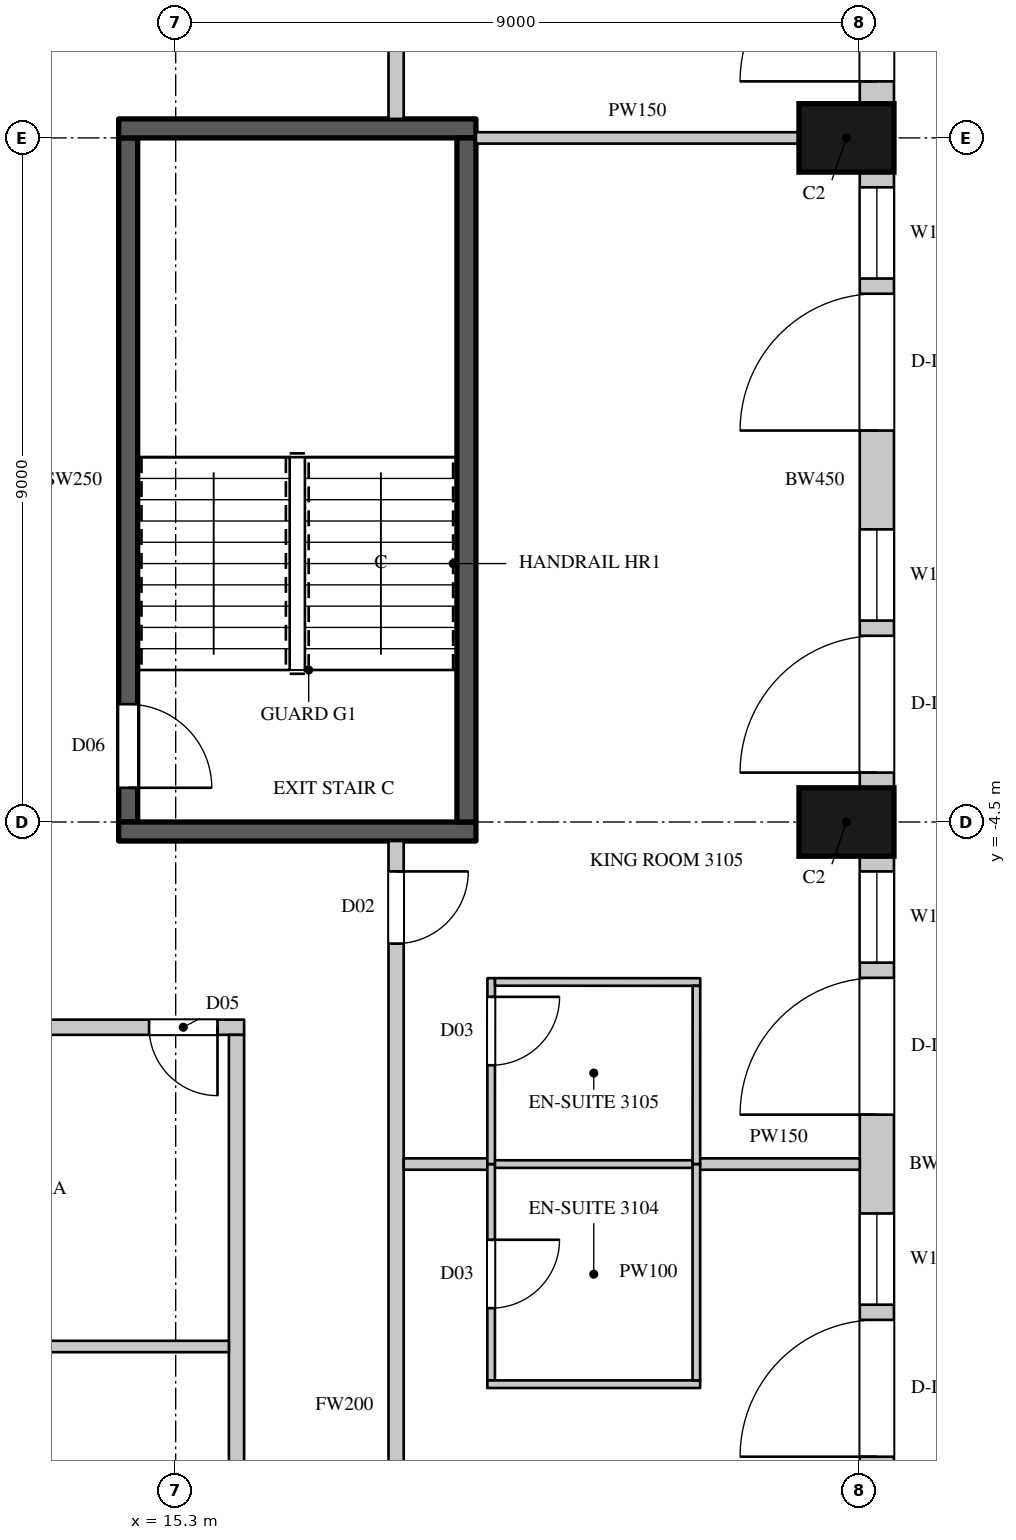
"""IFC4 building model, lengths in metres.
Left out: names, types, materials, properties, quantities, classifications, styles, units other than length and angle.
Written with IfcOpenShell. Run it as: python <this file> out.ifc"""

import sys

from ifc_helpers import new_model, si_unit, direction, frame, frame_2d, origin, origin_2d, place, context, subcontext, project, spatial, rectangle, extrude, element, fill, save


model = new_model("IFC4")
c1 = context("Model", 3, precision=1e-05, world=origin(), true_north=direction((0.0, 1.0)))
c2 = subcontext(c1, "Body", "Model", "MODEL_VIEW")
j1 = project(units=[si_unit("LENGTHUNIT", "METRE"), si_unit("PLANEANGLEUNIT", "RADIAN")], contexts=[c1])
p1 = place(None, origin())
s1 = spatial("IfcSite", under=j1, at=p1, CompositionType="ELEMENT")
p2 = place(p1, origin())
s2 = spatial("IfcBuilding", under=s1, at=p2, CompositionType="ELEMENT")
p3 = place(p2, frame((0.0, 0.0, 141.9)))
s3 = spatial("IfcBuildingStorey", under=s2, at=p3, CompositionType="ELEMENT", Elevation=141.9)
for number, where, z_axis, x_axis in (
    (1, (24.125, -4.5, 0.0), (0.0, 0.0, 1.0), (0.0, 1.0, 0.0)),
    (2, (24.125, 4.5, 0.0), (0.0, 0.0, 1.0), (0.0, 1.0, 0.0)),
):
    element("IfcColumn", number, at=place(p3, frame(where, z_axis=z_axis, x_axis=x_axis)), inside=s3, PredefinedType="COLUMN", context=c2, shape_type="SweptSolid", body=[
        extrude(rectangle(XDim=0.9, YDim=1.25, at=origin_2d()), origin(), (0.0, 0.0, 1.0), 3.6),
    ])
p4 = place(p3, frame((24.525, -13.05, 0.0), z_axis=(0.0, 0.0, 1.0), x_axis=(0.0, 1.0, 0.0)))
e3 = element("IfcWall", 3, at=p4, inside=s3, PredefinedType="SOLIDWALL", context=c2, shape_type="SweptSolid", body=[
    extrude(rectangle(XDim=8.1, YDim=0.45, at=frame_2d((4.05, 0.0))), origin(), (0.0, 0.0, 1.0), 3.3),
])
p5 = place(p4, frame((0.2, 0.0, 0.0)))
e4 = element("IfcOpeningElement", 4, at=p5, cuts=e3, PredefinedType="OPENING", context=c2, shape_type="SweptSolid", body=[
    extrude(rectangle(XDim=1.8, YDim=2.4, at=frame_2d((0.9, 1.2))), frame((0.0, 0.235, 0.0), z_axis=(0.0, -1.0, 0.0), x_axis=(1.0, 0.0, 0.0)), (0.0, 0.0, 1.0), 0.47),
])
p6 = place(p4, frame((2.2, 0.0, 1.05)))
e5 = element("IfcOpeningElement", 5, at=p6, cuts=e3, PredefinedType="OPENING", context=c2, shape_type="SweptSolid", body=[
    extrude(rectangle(XDim=1.2, YDim=2.0, at=frame_2d((0.6, 1.0))), frame((0.0, 0.235, 0.0), z_axis=(0.0, -1.0, 0.0), x_axis=(1.0, 0.0, 0.0)), (0.0, 0.0, 1.0), 0.47),
])
p7 = place(p4, frame((4.7, 0.0, 0.0)))
e6 = element("IfcOpeningElement", 6, at=p7, cuts=e3, PredefinedType="OPENING", context=c2, shape_type="SweptSolid", body=[
    extrude(rectangle(XDim=1.8, YDim=2.4, at=frame_2d((0.9, 1.2))), frame((0.0, 0.235, 0.0), z_axis=(0.0, -1.0, 0.0), x_axis=(1.0, 0.0, 0.0)), (0.0, 0.0, 1.0), 0.47),
])
p8 = place(p4, frame((6.7, 0.0, 1.05)))
e7 = element("IfcOpeningElement", 7, at=p8, cuts=e3, PredefinedType="OPENING", context=c2, shape_type="SweptSolid", body=[
    extrude(rectangle(XDim=1.2, YDim=2.0, at=frame_2d((0.6, 1.0))), frame((0.0, 0.235, 0.0), z_axis=(0.0, -1.0, 0.0), x_axis=(1.0, 0.0, 0.0)), (0.0, 0.0, 1.0), 0.47),
])
p9 = place(p3, frame((24.525, -4.05, 0.0), z_axis=(0.0, 0.0, 1.0), x_axis=(0.0, 1.0, 0.0)))
e8 = element("IfcWall", 8, at=p9, inside=s3, PredefinedType="SOLIDWALL", context=c2, shape_type="SweptSolid", body=[
    extrude(rectangle(XDim=8.1, YDim=0.45, at=frame_2d((4.05, 0.0))), origin(), (0.0, 0.0, 1.0), 3.3),
])
p10 = place(p9, frame((0.2, 0.0, 0.0)))
e9 = element("IfcOpeningElement", 9, at=p10, cuts=e8, PredefinedType="OPENING", context=c2, shape_type="SweptSolid", body=[
    extrude(rectangle(XDim=1.8, YDim=2.4, at=frame_2d((0.9, 1.2))), frame((0.0, 0.235, 0.0), z_axis=(0.0, -1.0, 0.0), x_axis=(1.0, 0.0, 0.0)), (0.0, 0.0, 1.0), 0.47),
])
p11 = place(p9, frame((2.2, 0.0, 1.05)))
e10 = element("IfcOpeningElement", 10, at=p11, cuts=e8, PredefinedType="OPENING", context=c2, shape_type="SweptSolid", body=[
    extrude(rectangle(XDim=1.2, YDim=2.0, at=frame_2d((0.6, 1.0))), frame((0.0, 0.235, 0.0), z_axis=(0.0, -1.0, 0.0), x_axis=(1.0, 0.0, 0.0)), (0.0, 0.0, 1.0), 0.47),
])
p12 = place(p9, frame((4.7, 0.0, 0.0)))
e11 = element("IfcOpeningElement", 11, at=p12, cuts=e8, PredefinedType="OPENING", context=c2, shape_type="SweptSolid", body=[
    extrude(rectangle(XDim=1.8, YDim=2.4, at=frame_2d((0.9, 1.2))), frame((0.0, 0.235, 0.0), z_axis=(0.0, -1.0, 0.0), x_axis=(1.0, 0.0, 0.0)), (0.0, 0.0, 1.0), 0.47),
])
p13 = place(p9, frame((6.7, 0.0, 1.05)))
e12 = element("IfcOpeningElement", 12, at=p13, cuts=e8, PredefinedType="OPENING", context=c2, shape_type="SweptSolid", body=[
    extrude(rectangle(XDim=1.2, YDim=2.0, at=frame_2d((0.6, 1.0))), frame((0.0, 0.235, 0.0), z_axis=(0.0, -1.0, 0.0), x_axis=(1.0, 0.0, 0.0)), (0.0, 0.0, 1.0), 0.47),
])
p14 = place(p3, frame((24.525, 4.95, 0.0), z_axis=(0.0, 0.0, 1.0), x_axis=(0.0, 1.0, 0.0)))
e13 = element("IfcWall", 13, at=p14, inside=s3, PredefinedType="SOLIDWALL", context=c2, shape_type="SweptSolid", body=[
    extrude(rectangle(XDim=8.439, YDim=0.45, at=frame_2d((4.219, 0.0))), origin(), (0.0, 0.0, 1.0), 3.3),
])
p15 = place(p14, frame((0.294, 0.0, 0.0)))
e14 = element("IfcOpeningElement", 14, at=p15, cuts=e13, PredefinedType="OPENING", context=c2, shape_type="SweptSolid", body=[
    extrude(rectangle(XDim=1.8, YDim=2.4, at=frame_2d((0.9, 1.2))), frame((0.0, 0.235, 0.0), z_axis=(0.0, -1.0, 0.0), x_axis=(1.0, 0.0, 0.0)), (0.0, 0.0, 1.0), 0.47),
])
p16 = place(p14, frame((2.294, 0.0, 1.05)))
e15 = element("IfcOpeningElement", 15, at=p16, cuts=e13, PredefinedType="OPENING", context=c2, shape_type="SweptSolid", body=[
    extrude(rectangle(XDim=1.2, YDim=2.0, at=frame_2d((0.6, 1.0))), frame((0.0, 0.235, 0.0), z_axis=(0.0, -1.0, 0.0), x_axis=(1.0, 0.0, 0.0)), (0.0, 0.0, 1.0), 0.47),
])
p17 = place(p14, frame((5.232, 0.0, 1.05)))
e16 = element("IfcOpeningElement", 16, at=p17, cuts=e13, PredefinedType="OPENING", context=c2, shape_type="SweptSolid", body=[
    extrude(rectangle(XDim=2.7, YDim=2.0, at=frame_2d((1.35, 1.0))), frame((0.0, 0.235, 0.0), z_axis=(0.0, -1.0, 0.0), x_axis=(1.0, 0.0, 0.0)), (0.0, 0.0, 1.0), 0.47),
])
p18 = place(p3, frame((10.5, -7.2, 0.0), z_axis=(0.0, 0.0, 1.0), x_axis=(1.0, 0.0, 0.0)))
e17 = element("IfcWall", 17, at=p18, inside=s3, PredefinedType="PARTITIONING", context=c2, shape_type="SweptSolid", body=[
    extrude(rectangle(XDim=5.7, YDim=0.2, at=frame_2d((2.85, 0.0))), origin(), (0.0, 0.0, 1.0), 3.3),
])
p19 = place(p18, frame((4.45, 0.0, 0.0)))
e18 = element("IfcOpeningElement", 18, at=p19, cuts=e17, PredefinedType="OPENING", context=c2, shape_type="SweptSolid", body=[
    extrude(rectangle(XDim=0.9, YDim=2.2, at=frame_2d((0.45, 1.1))), frame((0.0, 0.11, 0.0), z_axis=(0.0, -1.0, 0.0), x_axis=(1.0, 0.0, 0.0)), (0.0, 0.0, 1.0), 0.22),
])
p20 = place(p3, frame((16.1, -17.4, 0.0), z_axis=(0.0, 0.0, 1.0), x_axis=(0.0, 1.0, 0.0)))
e19 = element("IfcWall", 19, at=p20, inside=s3, PredefinedType="PARTITIONING", context=c2, shape_type="SweptSolid", body=[
    extrude(rectangle(XDim=10.1, YDim=0.2, at=frame_2d((5.05, 0.0))), origin(), (0.0, 0.0, 1.0), 3.3),
])
p21 = place(p3, frame((18.2, -19.6, 0.0), z_axis=(0.0, 0.0, 1.0), x_axis=(0.0, 1.0, 0.0)))
e20 = element("IfcWall", 20, at=p21, inside=s3, PredefinedType="PARTITIONING", context=c2, shape_type="SweptSolid", body=[
    extrude(rectangle(XDim=14.85, YDim=0.2, at=frame_2d((7.425, 0.0))), origin(), (0.0, 0.0, 1.0), 3.3),
])
p22 = place(p21, frame((3.9, 0.0, 0.0)))
e21 = element("IfcOpeningElement", 21, at=p22, cuts=e20, PredefinedType="OPENING", context=c2, shape_type="SweptSolid", body=[
    extrude(rectangle(XDim=0.95, YDim=2.2, at=frame_2d((0.475, 1.1))), frame((0.0, 0.11, 0.0), z_axis=(0.0, -1.0, 0.0), x_axis=(1.0, 0.0, 0.0)), (0.0, 0.0, 1.0), 0.22),
])
p23 = place(p21, frame((13.5, 0.0, 0.0)))
e22 = element("IfcOpeningElement", 22, at=p23, cuts=e20, PredefinedType="OPENING", context=c2, shape_type="SweptSolid", body=[
    extrude(rectangle(XDim=0.95, YDim=2.2, at=frame_2d((0.475, 1.1))), frame((0.0, 0.11, 0.0), z_axis=(0.0, -1.0, 0.0), x_axis=(1.0, 0.0, 0.0)), (0.0, 0.0, 1.0), 0.22),
])
p24 = place(p3, frame((18.2, 4.75, 0.0), z_axis=(0.0, 0.0, 1.0), x_axis=(0.0, 1.0, 0.0)))
e23 = element("IfcWall", 23, at=p24, inside=s3, PredefinedType="PARTITIONING", context=c2, shape_type="SweptSolid", body=[
    extrude(rectangle(XDim=14.164, YDim=0.2, at=frame_2d((7.082, 0.0))), origin(), (0.0, 0.0, 1.0), 3.3),
])
p25 = place(p24, frame((1.7, 0.0, 0.0)))
e24 = element("IfcOpeningElement", 24, at=p25, cuts=e23, PredefinedType="OPENING", context=c2, shape_type="SweptSolid", body=[
    extrude(rectangle(XDim=0.9, YDim=2.2, at=frame_2d((0.45, 1.1))), frame((0.0, 0.11, 0.0), z_axis=(0.0, -1.0, 0.0), x_axis=(1.0, 0.0, 0.0)), (0.0, 0.0, 1.0), 0.22),
])
p26 = place(p3, frame((10.4, -11.4, 0.0), z_axis=(0.0, 0.0, 1.0), x_axis=(1.0, 0.0, 0.0)))
e25 = element("IfcWall", 25, at=p26, inside=s3, PredefinedType="PARTITIONING", context=c2, shape_type="SweptSolid", body=[
    extrude(rectangle(XDim=5.6, YDim=0.15, at=frame_2d((2.8, 0.0))), origin(), (0.0, 0.0, 1.0), 3.3),
])
p27 = place(p3, frame((18.3, -9.0, 0.0), z_axis=(0.0, 0.0, 1.0), x_axis=(1.0, 0.0, 0.0)))
e26 = element("IfcWall", 26, at=p27, inside=s3, PredefinedType="PARTITIONING", context=c2, shape_type="SweptSolid", body=[
    extrude(rectangle(XDim=1.13, YDim=0.15, at=frame_2d((0.565, 0.0))), origin(), (0.0, 0.0, 1.0), 3.3),
])
p28 = place(p3, frame((19.25, 4.5, 0.0), z_axis=(0.0, 0.0, 1.0), x_axis=(1.0, 0.0, 0.0)))
e27 = element("IfcWall", 27, at=p28, inside=s3, PredefinedType="PARTITIONING", context=c2, shape_type="SweptSolid", body=[
    extrude(rectangle(XDim=4.25, YDim=0.15, at=frame_2d((2.125, 0.0))), origin(), (0.0, 0.0, 1.0), 3.3),
])
p29 = place(p3, frame((22.17, -9.0, 0.0), z_axis=(0.0, 0.0, 1.0), x_axis=(1.0, 0.0, 0.0)))
e28 = element("IfcWall", 28, at=p29, inside=s3, PredefinedType="PARTITIONING", context=c2, shape_type="SweptSolid", body=[
    extrude(rectangle(XDim=2.13, YDim=0.15, at=frame_2d((1.065, 0.0))), origin(), (0.0, 0.0, 1.0), 3.3),
])
p30 = place(p3, frame((14.675, -4.5, 0.0), z_axis=(0.0, 0.0, 1.0), x_axis=(0.0, 1.0, 0.0)))
e29 = element("IfcWall", 29, at=p30, inside=s3, PredefinedType="SHEAR", context=c2, shape_type="SweptSolid", body=[
    extrude(rectangle(XDim=9.0, YDim=0.25, at=frame_2d((4.5, 0.0))), origin(), (0.0, 0.0, 1.0), 3.3),
])
p31 = place(p30, frame((0.45, 0.0, 0.0)))
e30 = element("IfcOpeningElement", 30, at=p31, cuts=e29, PredefinedType="OPENING", context=c2, shape_type="SweptSolid", body=[
    extrude(rectangle(XDim=1.1, YDim=2.2, at=frame_2d((0.55, 1.1))), frame((0.0, 0.135, 0.0), z_axis=(0.0, -1.0, 0.0), x_axis=(1.0, 0.0, 0.0)), (0.0, 0.0, 1.0), 0.27),
])
for number, where, z_axis, x_axis in (
    (31, (14.55, -4.625, 0.0), (0.0, 0.0, 1.0), (1.0, 0.0, 0.0)),
    (32, (14.55, 4.625, 0.0), (0.0, 0.0, 1.0), (1.0, 0.0, 0.0)),
):
    element("IfcWall", number, at=place(p3, frame(where, z_axis=z_axis, x_axis=x_axis)), inside=s3, PredefinedType="SHEAR", context=c2, shape_type="SweptSolid", body=[
        extrude(rectangle(XDim=4.7, YDim=0.25, at=frame_2d((2.35, 0.0))), origin(), (0.0, 0.0, 1.0), 3.3),
    ])
p32 = place(p3, frame((19.125, -4.5, 0.0), z_axis=(0.0, 0.0, 1.0), x_axis=(0.0, 1.0, 0.0)))
e33 = element("IfcWall", 33, at=p32, inside=s3, PredefinedType="SHEAR", context=c2, shape_type="SweptSolid", body=[
    extrude(rectangle(XDim=9.0, YDim=0.25, at=frame_2d((4.5, 0.0))), origin(), (0.0, 0.0, 1.0), 3.3),
])
p33 = place(p3, frame((19.43, -9.0, 0.0), z_axis=(0.0, 0.0, 1.0), x_axis=(1.0, 0.0, 0.0)))
e34 = element("IfcWall", 34, at=p33, inside=s3, PredefinedType="PARTITIONING", context=c2, shape_type="SweptSolid", body=[
    extrude(rectangle(XDim=2.74, YDim=0.1, at=frame_2d((1.37, 0.0))), origin(), (0.0, 0.0, 1.0), 3.3),
])
p34 = place(p3, frame((19.45, -11.846, 0.0), z_axis=(0.0, 0.0, 1.0), x_axis=(0.0, 1.0, 0.0)))
e35 = element("IfcWall", 35, at=p34, inside=s3, PredefinedType="PARTITIONING", context=c2, shape_type="SweptSolid", body=[
    extrude(rectangle(XDim=2.846, YDim=0.1, at=frame_2d((1.423, 0.0))), origin(), (0.0, 0.0, 1.0), 3.3),
])
p35 = place(p34, frame((0.95, 0.0, 0.0)))
e36 = element("IfcOpeningElement", 36, at=p35, cuts=e35, PredefinedType="OPENING", context=c2, shape_type="SweptSolid", body=[
    extrude(rectangle(XDim=0.9, YDim=2.2, at=frame_2d((0.45, 1.1))), frame((0.0, 0.06, 0.0), z_axis=(0.0, -1.0, 0.0), x_axis=(1.0, 0.0, 0.0)), (0.0, 0.0, 1.0), 0.12),
])
p36 = place(p3, frame((19.4, -11.896, 0.0), z_axis=(0.0, 0.0, 1.0), x_axis=(1.0, 0.0, 0.0)))
e37 = element("IfcWall", 37, at=p36, inside=s3, PredefinedType="PARTITIONING", context=c2, shape_type="SweptSolid", body=[
    extrude(rectangle(XDim=2.8, YDim=0.1, at=frame_2d((1.4, 0.0))), origin(), (0.0, 0.0, 1.0), 3.3),
])
p37 = place(p3, frame((19.45, -9.0, 0.0), z_axis=(0.0, 0.0, 1.0), x_axis=(0.000399241409, 0.999999920303, 0.0)))
e38 = element("IfcWall", 38, at=p37, inside=s3, PredefinedType="PARTITIONING", context=c2, shape_type="SweptSolid", body=[
    extrude(rectangle(XDim=2.446, YDim=0.1, at=frame_2d((1.223, 0.0))), origin(), (0.0, 0.0, 1.0), 3.3),
])
p38 = place(p37, frame((1.3, 0.0, 0.0)))
e39 = element("IfcOpeningElement", 39, at=p38, cuts=e38, PredefinedType="OPENING", context=c2, shape_type="SweptSolid", body=[
    extrude(rectangle(XDim=0.9, YDim=2.2, at=frame_2d((0.45, 1.1))), frame((0.0, 0.06, 0.0), z_axis=(0.0, -1.0, 0.0), x_axis=(1.0, 0.0, 0.0)), (0.0, 0.0, 1.0), 0.12),
])
p39 = place(p3, frame((19.501, -6.604, 0.0), z_axis=(0.0, 0.0, 1.0), x_axis=(0.999999934588, -0.000361696332, 0.0)))
e40 = element("IfcWall", 40, at=p39, inside=s3, PredefinedType="PARTITIONING", context=c2, shape_type="SweptSolid", body=[
    extrude(rectangle(XDim=2.7, YDim=0.1, at=frame_2d((1.35, 0.0))), origin(), (0.0, 0.0, 1.0), 3.3),
])
p40 = place(p3, frame((22.15, -11.846, 0.0), z_axis=(0.0, 0.0, 1.0), x_axis=(0.0, 1.0, 0.0)))
e41 = element("IfcWall", 41, at=p40, inside=s3, PredefinedType="PARTITIONING", context=c2, shape_type="SweptSolid", body=[
    extrude(rectangle(XDim=2.846, YDim=0.1, at=frame_2d((1.423, 0.0))), origin(), (0.0, 0.0, 1.0), 3.3),
])
p41 = place(p3, frame((22.15, -9.0, 0.0), z_axis=(0.0, 0.0, 1.0), x_axis=(0.00041644973, 0.999999913285, 0.0)))
e42 = element("IfcWall", 42, at=p41, inside=s3, PredefinedType="PARTITIONING", context=c2, shape_type="SweptSolid", body=[
    extrude(rectangle(XDim=2.345, YDim=0.1, at=frame_2d((1.172, 0.0))), origin(), (0.0, 0.0, 1.0), 3.3),
])
p42 = place(p5, origin())
e43 = element("IfcDoor", 43, at=p42, inside=s3, OperationType="SLIDING_TO_LEFT", PredefinedType="DOOR", context=c2, shape_type="SweptSolid", body=[
    extrude(rectangle(XDim=1.8, YDim=2.4, at=frame_2d((0.9, 1.2))), frame((0.0, 0.13, 0.0), z_axis=(0.0, -1.0, 0.0), x_axis=(1.0, 0.0, 0.0)), (0.0, 0.0, 1.0), 0.05),
])
fill(e4, e43)
p43 = place(p6, origin())
e44 = element("IfcWindow", 44, at=p43, inside=s3, PartitioningType="SINGLE_PANEL", PredefinedType="WINDOW", context=c2, shape_type="SweptSolid", body=[
    extrude(rectangle(XDim=1.2, YDim=2.0, at=frame_2d((0.6, 1.0))), frame((0.0, 0.135, 0.0), z_axis=(0.0, -1.0, 0.0), x_axis=(1.0, 0.0, 0.0)), (0.0, 0.0, 1.0), 0.06),
])
fill(e5, e44)
p44 = place(p7, origin())
e45 = element("IfcDoor", 45, at=p44, inside=s3, OperationType="SLIDING_TO_LEFT", PredefinedType="DOOR", context=c2, shape_type="SweptSolid", body=[
    extrude(rectangle(XDim=1.8, YDim=2.4, at=frame_2d((0.9, 1.2))), frame((0.0, 0.13, 0.0), z_axis=(0.0, -1.0, 0.0), x_axis=(1.0, 0.0, 0.0)), (0.0, 0.0, 1.0), 0.05),
])
fill(e6, e45)
p45 = place(p8, origin())
e46 = element("IfcWindow", 46, at=p45, inside=s3, PartitioningType="SINGLE_PANEL", PredefinedType="WINDOW", context=c2, shape_type="SweptSolid", body=[
    extrude(rectangle(XDim=1.2, YDim=2.0, at=frame_2d((0.6, 1.0))), frame((0.0, 0.135, 0.0), z_axis=(0.0, -1.0, 0.0), x_axis=(1.0, 0.0, 0.0)), (0.0, 0.0, 1.0), 0.06),
])
fill(e7, e46)
p46 = place(p10, origin())
e47 = element("IfcDoor", 47, at=p46, inside=s3, OperationType="SLIDING_TO_LEFT", PredefinedType="DOOR", context=c2, shape_type="SweptSolid", body=[
    extrude(rectangle(XDim=1.8, YDim=2.4, at=frame_2d((0.9, 1.2))), frame((0.0, 0.13, 0.0), z_axis=(0.0, -1.0, 0.0), x_axis=(1.0, 0.0, 0.0)), (0.0, 0.0, 1.0), 0.05),
])
fill(e9, e47)
p47 = place(p11, origin())
e48 = element("IfcWindow", 48, at=p47, inside=s3, PartitioningType="SINGLE_PANEL", PredefinedType="WINDOW", context=c2, shape_type="SweptSolid", body=[
    extrude(rectangle(XDim=1.2, YDim=2.0, at=frame_2d((0.6, 1.0))), frame((0.0, 0.135, 0.0), z_axis=(0.0, -1.0, 0.0), x_axis=(1.0, 0.0, 0.0)), (0.0, 0.0, 1.0), 0.06),
])
fill(e10, e48)
p48 = place(p12, origin())
e49 = element("IfcDoor", 49, at=p48, inside=s3, OperationType="SLIDING_TO_LEFT", PredefinedType="DOOR", context=c2, shape_type="SweptSolid", body=[
    extrude(rectangle(XDim=1.8, YDim=2.4, at=frame_2d((0.9, 1.2))), frame((0.0, 0.13, 0.0), z_axis=(0.0, -1.0, 0.0), x_axis=(1.0, 0.0, 0.0)), (0.0, 0.0, 1.0), 0.05),
])
fill(e11, e49)
p49 = place(p13, origin())
e50 = element("IfcWindow", 50, at=p49, inside=s3, PartitioningType="SINGLE_PANEL", PredefinedType="WINDOW", context=c2, shape_type="SweptSolid", body=[
    extrude(rectangle(XDim=1.2, YDim=2.0, at=frame_2d((0.6, 1.0))), frame((0.0, 0.135, 0.0), z_axis=(0.0, -1.0, 0.0), x_axis=(1.0, 0.0, 0.0)), (0.0, 0.0, 1.0), 0.06),
])
fill(e12, e50)
p50 = place(p15, origin())
e51 = element("IfcDoor", 51, at=p50, inside=s3, OperationType="SLIDING_TO_LEFT", PredefinedType="DOOR", context=c2, shape_type="SweptSolid", body=[
    extrude(rectangle(XDim=1.8, YDim=2.4, at=frame_2d((0.9, 1.2))), frame((0.0, 0.13, 0.0), z_axis=(0.0, -1.0, 0.0), x_axis=(1.0, 0.0, 0.0)), (0.0, 0.0, 1.0), 0.05),
])
fill(e14, e51)
p51 = place(p19, origin())
e52 = element("IfcDoor", 52, at=p51, inside=s3, OperationType="SINGLE_SWING_LEFT", PredefinedType="DOOR", context=c2, shape_type="SweptSolid", body=[
    extrude(rectangle(XDim=0.9, YDim=2.2, at=frame_2d((0.45, 1.1))), frame((0.0, 0.025, 0.0), z_axis=(0.0, -1.0, 0.0), x_axis=(1.0, 0.0, 0.0)), (0.0, 0.0, 1.0), 0.05),
])
fill(e18, e52)
p52 = place(p35, origin())
e53 = element("IfcDoor", 53, at=p52, inside=s3, OperationType="SINGLE_SWING_LEFT", PredefinedType="DOOR", context=c2, shape_type="SweptSolid", body=[
    extrude(rectangle(XDim=0.9, YDim=2.2, at=frame_2d((0.45, 1.1))), frame((0.0, 0.025, 0.0), z_axis=(0.0, -1.0, 0.0), x_axis=(1.0, 0.0, 0.0)), (0.0, 0.0, 1.0), 0.05),
])
fill(e36, e53)
p53 = place(p23, origin())
e54 = element("IfcDoor", 54, at=p53, inside=s3, OperationType="SINGLE_SWING_LEFT", PredefinedType="DOOR", context=c2, shape_type="SweptSolid", body=[
    extrude(rectangle(XDim=0.95, YDim=2.2, at=frame_2d((0.475, 1.1))), frame((0.0, 0.025, 0.0), z_axis=(0.0, -1.0, 0.0), x_axis=(1.0, 0.0, 0.0)), (0.0, 0.0, 1.0), 0.05),
])
fill(e22, e54)
p54 = place(p38, origin())
e55 = element("IfcDoor", 55, at=p54, inside=s3, OperationType="SINGLE_SWING_LEFT", PredefinedType="DOOR", context=c2, shape_type="SweptSolid", body=[
    extrude(rectangle(XDim=0.9, YDim=2.2, at=frame_2d((0.45, 1.1))), frame((0.0, 0.025, 0.0), z_axis=(0.0, -1.0, 0.0), x_axis=(1.0, 0.0, 0.0)), (0.0, 0.0, 1.0), 0.05),
])
fill(e39, e55)
p55 = place(p31, origin())
e56 = element("IfcDoor", 56, at=p55, inside=s3, OperationType="SINGLE_SWING_RIGHT", PredefinedType="DOOR", context=c2, shape_type="SweptSolid", body=[
    extrude(rectangle(XDim=1.1, YDim=2.2, at=frame_2d((0.55, 1.1))), frame((0.0, 0.025, 0.0), z_axis=(0.0, -1.0, 0.0), x_axis=(1.0, 0.0, 0.0)), (0.0, 0.0, 1.0), 0.05),
])
fill(e30, e56)
save(model, sys.argv[1])
